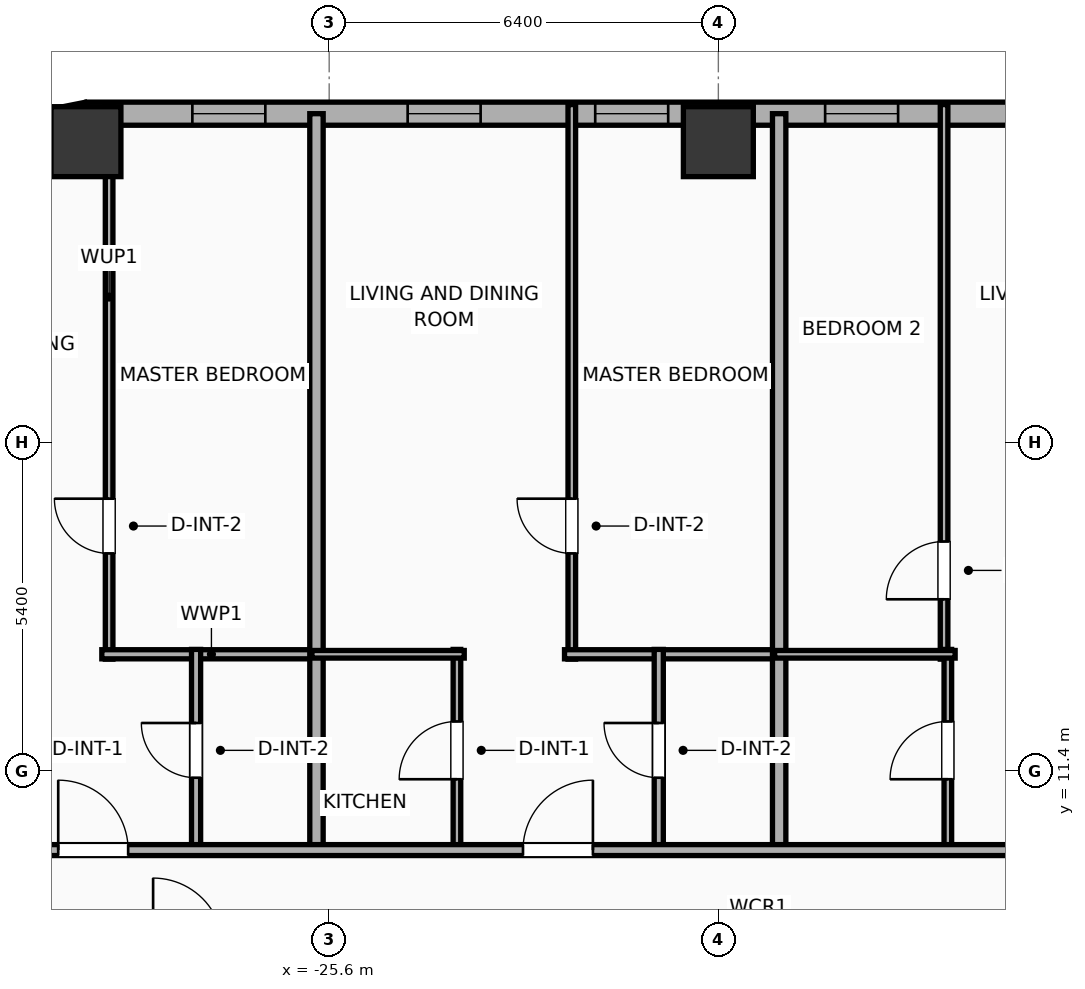
"""IFC4 building model, lengths in metres.
Left out: names, types, materials, properties, quantities, classifications, styles, units other than length and angle.
Written with IfcOpenShell. Run it as: python <this file> out.ifc"""

import sys

from ifc_helpers import new_model, si_unit, direction, frame, frame_2d, origin, origin_2d, place, context, subcontext, project, spatial, rectangle, hollow_rectangle, extrude, element, fill, save


model = new_model("IFC4")
c1 = context("Model", 3, precision=1e-05, world=origin(), true_north=direction((0.0, 1.0)))
c2 = subcontext(c1, "Body", "Model", "MODEL_VIEW")
j1 = project(units=[si_unit("LENGTHUNIT", "METRE"), si_unit("PLANEANGLEUNIT", "RADIAN")], contexts=[c1])
p1 = place(None, origin())
s1 = spatial("IfcSite", under=j1, at=p1, CompositionType="ELEMENT")
p2 = place(p1, origin())
s2 = spatial("IfcBuilding", under=s1, at=p2, CompositionType="ELEMENT")
p3 = place(p2, frame((0.0, 0.0, 41.6)))
s3 = spatial("IfcBuildingStorey", under=s2, at=p3, CompositionType="ELEMENT", Elevation=41.6)
for number, where, z_axis, x_axis in (
    (1, (-19.2, 21.75, 0.0), (0.0, 0.0, 1.0), (1.0, 0.0, 0.0)),
    (2, (-29.6, 21.75, 0.0), (0.0, 0.0, 1.0), (1.0, 0.0, 0.0)),
):
    element("IfcColumn", number, at=place(p3, frame(where, z_axis=z_axis, x_axis=x_axis)), inside=s3, PredefinedType="COLUMN", context=c2, shape_type="SweptSolid", body=[
        extrude(hollow_rectangle(XDim=1.15, YDim=1.15, WallThickness=0.04, at=origin_2d()), origin(), (0.0, 0.0, 1.0), 3.9),
    ])
p4 = place(p3, frame((-31.057, 21.917, 0.0), z_axis=(0.0, 0.0, 1.0), x_axis=(0.980786132421, 0.195086038585, 0.0)))
e3 = element("IfcWall", 3, at=p4, inside=s3, PredefinedType="ELEMENTEDWALL", context=c2, shape_type="SweptSolid", body=[
    extrude(rectangle(XDim=1.504, YDim=0.38, at=frame_2d((0.752, 0.0))), origin(), (0.0, 0.0, 1.0), 3.65),
])
p5 = place(p3, frame((-29.581, 22.21, 0.0), z_axis=(0.0, 0.0, 1.0), x_axis=(1.0, 0.0, 0.0)))
e4 = element("IfcWall", 4, at=p5, inside=s3, PredefinedType="ELEMENTEDWALL", context=c2, shape_type="SweptSolid", body=[
    extrude(rectangle(XDim=51.963, YDim=0.38, at=frame_2d((25.981, 0.0))), origin(), (0.0, 0.0, 1.0), 3.65),
])
p6 = place(p5, frame((25.631, 0.0, 0.75)))
e5 = element("IfcOpeningElement", 5, at=p6, cuts=e4, PredefinedType="OPENING", context=c2, shape_type="SweptSolid", body=[
    extrude(rectangle(XDim=2.4, YDim=2.1, at=frame_2d((1.2, 1.05))), frame((0.0, 0.2, 0.0), z_axis=(0.0, -1.0, 0.0), x_axis=(1.0, 0.0, 0.0)), (0.0, 0.0, 1.0), 0.4),
])
p7 = place(p5, frame((42.952, 0.0, 0.75)))
e6 = element("IfcOpeningElement", 6, at=p7, cuts=e4, PredefinedType="OPENING", context=c2, shape_type="SweptSolid", body=[
    extrude(rectangle(XDim=2.4, YDim=2.1, at=frame_2d((1.2, 1.05))), frame((0.0, 0.2, 0.0), z_axis=(0.0, -1.0, 0.0), x_axis=(1.0, 0.0, 0.0)), (0.0, 0.0, 1.0), 0.4),
])
p8 = place(p5, frame((1.731, 0.0, 0.75)))
e7 = element("IfcOpeningElement", 7, at=p8, cuts=e4, PredefinedType="OPENING", context=c2, shape_type="SweptSolid", body=[
    extrude(rectangle(XDim=1.2, YDim=2.05, at=frame_2d((0.6, 1.025))), frame((0.0, 0.2, 0.0), z_axis=(0.0, -1.0, 0.0), x_axis=(1.0, 0.0, 0.0)), (0.0, 0.0, 1.0), 0.4),
])
p9 = place(p5, frame((5.272, 0.0, 0.75)))
e8 = element("IfcOpeningElement", 8, at=p9, cuts=e4, PredefinedType="OPENING", context=c2, shape_type="SweptSolid", body=[
    extrude(rectangle(XDim=1.2, YDim=2.05, at=frame_2d((0.6, 1.025))), frame((0.0, 0.2, 0.0), z_axis=(0.0, -1.0, 0.0), x_axis=(1.0, 0.0, 0.0)), (0.0, 0.0, 1.0), 0.4),
])
p10 = place(p5, frame((8.356, 0.0, 0.75)))
e9 = element("IfcOpeningElement", 9, at=p10, cuts=e4, PredefinedType="OPENING", context=c2, shape_type="SweptSolid", body=[
    extrude(rectangle(XDim=1.2, YDim=2.05, at=frame_2d((0.6, 1.025))), frame((0.0, 0.2, 0.0), z_axis=(0.0, -1.0, 0.0), x_axis=(1.0, 0.0, 0.0)), (0.0, 0.0, 1.0), 0.4),
])
p11 = place(p5, frame((15.632, 0.0, 0.75)))
e10 = element("IfcOpeningElement", 10, at=p11, cuts=e4, PredefinedType="OPENING", context=c2, shape_type="SweptSolid", body=[
    extrude(rectangle(XDim=1.2, YDim=2.05, at=frame_2d((0.6, 1.025))), frame((0.0, 0.2, 0.0), z_axis=(0.0, -1.0, 0.0), x_axis=(1.0, 0.0, 0.0)), (0.0, 0.0, 1.0), 0.4),
])
p12 = place(p5, frame((12.137, 0.0, 0.75)))
e11 = element("IfcOpeningElement", 11, at=p12, cuts=e4, PredefinedType="OPENING", context=c2, shape_type="SweptSolid", body=[
    extrude(rectangle(XDim=1.2, YDim=2.05, at=frame_2d((0.6, 1.025))), frame((0.0, 0.2, 0.0), z_axis=(0.0, -1.0, 0.0), x_axis=(1.0, 0.0, 0.0)), (0.0, 0.0, 1.0), 0.4),
])
p13 = place(p5, frame((18.756, 0.0, 0.75)))
e12 = element("IfcOpeningElement", 12, at=p13, cuts=e4, PredefinedType="OPENING", context=c2, shape_type="SweptSolid", body=[
    extrude(rectangle(XDim=1.2, YDim=2.05, at=frame_2d((0.6, 1.025))), frame((0.0, 0.2, 0.0), z_axis=(0.0, -1.0, 0.0), x_axis=(1.0, 0.0, 0.0)), (0.0, 0.0, 1.0), 0.4),
])
p14 = place(p5, frame((22.907, 0.0, 0.75)))
e13 = element("IfcOpeningElement", 13, at=p14, cuts=e4, PredefinedType="OPENING", context=c2, shape_type="SweptSolid", body=[
    extrude(rectangle(XDim=1.2, YDim=2.05, at=frame_2d((0.6, 1.025))), frame((0.0, 0.2, 0.0), z_axis=(0.0, -1.0, 0.0), x_axis=(1.0, 0.0, 0.0)), (0.0, 0.0, 1.0), 0.4),
])
p15 = place(p5, frame((36.381, 0.0, 0.75)))
e14 = element("IfcOpeningElement", 14, at=p15, cuts=e4, PredefinedType="OPENING", context=c2, shape_type="SweptSolid", body=[
    extrude(rectangle(XDim=1.2, YDim=2.05, at=frame_2d((0.6, 1.025))), frame((0.0, 0.2, 0.0), z_axis=(0.0, -1.0, 0.0), x_axis=(1.0, 0.0, 0.0)), (0.0, 0.0, 1.0), 0.4),
])
p16 = place(p5, frame((32.886, 0.0, 0.75)))
e15 = element("IfcOpeningElement", 15, at=p16, cuts=e4, PredefinedType="OPENING", context=c2, shape_type="SweptSolid", body=[
    extrude(rectangle(XDim=1.2, YDim=2.05, at=frame_2d((0.6, 1.025))), frame((0.0, 0.2, 0.0), z_axis=(0.0, -1.0, 0.0), x_axis=(1.0, 0.0, 0.0)), (0.0, 0.0, 1.0), 0.4),
])
p17 = place(p5, frame((39.556, 0.0, 0.75)))
e16 = element("IfcOpeningElement", 16, at=p17, cuts=e4, PredefinedType="OPENING", context=c2, shape_type="SweptSolid", body=[
    extrude(rectangle(XDim=1.2, YDim=2.05, at=frame_2d((0.6, 1.025))), frame((0.0, 0.2, 0.0), z_axis=(0.0, -1.0, 0.0), x_axis=(1.0, 0.0, 0.0)), (0.0, 0.0, 1.0), 0.4),
])
p18 = place(p5, frame((46.885, 0.0, 0.75)))
e17 = element("IfcOpeningElement", 17, at=p18, cuts=e4, PredefinedType="OPENING", context=c2, shape_type="SweptSolid", body=[
    extrude(rectangle(XDim=1.2, YDim=2.05, at=frame_2d((0.6, 1.025))), frame((0.0, 0.2, 0.0), z_axis=(0.0, -1.0, 0.0), x_axis=(1.0, 0.0, 0.0)), (0.0, 0.0, 1.0), 0.4),
])
p19 = place(p5, frame((49.531, 0.0, 0.75)))
e18 = element("IfcOpeningElement", 18, at=p19, cuts=e4, PredefinedType="OPENING", context=c2, shape_type="SweptSolid", body=[
    extrude(rectangle(XDim=1.2, YDim=2.05, at=frame_2d((0.6, 1.025))), frame((0.0, 0.2, 0.0), z_axis=(0.0, -1.0, 0.0), x_axis=(1.0, 0.0, 0.0)), (0.0, 0.0, 1.0), 0.4),
])
p20 = place(p3, frame((-29.219, 13.24, 0.0), z_axis=(0.0, 0.0, 1.0), x_axis=(0.0, 1.0, 0.0)))
e19 = element("IfcWall", 19, at=p20, inside=s3, PredefinedType="PARTITIONING", context=c2, shape_type="SweptSolid", body=[
    extrude(rectangle(XDim=9.12, YDim=0.125, at=frame_2d((4.56, 0.0))), origin(), (0.0, 0.0, 1.0), 3.65),
])
p21 = place(p20, frame((1.739, 0.0, 0.0)))
e20 = element("IfcOpeningElement", 20, at=p21, cuts=e19, PredefinedType="OPENING", context=c2, shape_type="SweptSolid", body=[
    extrude(rectangle(XDim=0.9, YDim=2.05, at=frame_2d((0.45, 1.025))), frame((0.0, 0.073, 0.0), z_axis=(0.0, -1.0, 0.0), x_axis=(1.0, 0.0, 0.0)), (0.0, 0.0, 1.0), 0.145),
])
p22 = place(p3, frame((-29.339, 13.32, 0.0), z_axis=(0.0, 0.0, 1.0), x_axis=(1.0, 0.0, 0.0)))
e21 = element("IfcWall", 21, at=p22, inside=s3, PredefinedType="PLUMBINGWALL", context=c2, shape_type="SweptSolid", body=[
    extrude(rectangle(XDim=3.605, YDim=0.15, at=frame_2d((1.803, 0.0))), origin(), (0.0, 0.0, 1.0), 3.65),
])
p23 = place(p3, frame((-27.789, 10.08, 0.0), z_axis=(0.0, 0.0, 1.0), x_axis=(0.0, 1.0, 0.0)))
e22 = element("IfcWall", 22, at=p23, inside=s3, PredefinedType="PLUMBINGWALL", context=c2, shape_type="SweptSolid", body=[
    extrude(rectangle(XDim=3.32, YDim=0.15, at=frame_2d((1.66, 0.0))), origin(), (0.0, 0.0, 1.0), 3.65),
])
p24 = place(p23, frame((1.21, 0.0, 0.0)))
e23 = element("IfcOpeningElement", 23, at=p24, cuts=e22, PredefinedType="OPENING", context=c2, shape_type="SweptSolid", body=[
    extrude(rectangle(XDim=0.9, YDim=2.05, at=frame_2d((0.45, 1.025))), frame((0.0, 0.085, 0.0), z_axis=(0.0, -1.0, 0.0), x_axis=(1.0, 0.0, 0.0)), (0.0, 0.0, 1.0), 0.17),
])
p25 = place(p3, frame((-25.809, 10.02, 0.0), z_axis=(0.0, 0.0, 1.0), x_axis=(0.0, 1.0, 0.0)))
e24 = element("IfcWall", 24, at=p25, inside=s3, PredefinedType="PARTITIONING", context=c2, shape_type="SweptSolid", body=[
    extrude(rectangle(XDim=12.19, YDim=0.22, at=frame_2d((6.095, 0.0))), origin(), (0.0, 0.0, 1.0), 3.65),
])
p26 = place(p3, frame((-21.61, 13.24, 0.0), z_axis=(0.0, 0.0, 1.0), x_axis=(0.0, 1.0, 0.0)))
e25 = element("IfcWall", 25, at=p26, inside=s3, PredefinedType="PARTITIONING", context=c2, shape_type="SweptSolid", body=[
    extrude(rectangle(XDim=9.12, YDim=0.125, at=frame_2d((4.56, 0.0))), origin(), (0.0, 0.0, 1.0), 3.65),
])
p27 = place(p26, frame((1.739, 0.0, 0.0)))
e26 = element("IfcOpeningElement", 26, at=p27, cuts=e25, PredefinedType="OPENING", context=c2, shape_type="SweptSolid", body=[
    extrude(rectangle(XDim=0.9, YDim=2.05, at=frame_2d((0.45, 1.025))), frame((0.0, 0.073, 0.0), z_axis=(0.0, -1.0, 0.0), x_axis=(1.0, 0.0, 0.0)), (0.0, 0.0, 1.0), 0.145),
])
p28 = place(p3, frame((-21.73, 13.32, 0.0), z_axis=(0.0, 0.0, 1.0), x_axis=(1.0, 0.0, 0.0)))
e27 = element("IfcWall", 27, at=p28, inside=s3, PredefinedType="PLUMBINGWALL", context=c2, shape_type="SweptSolid", body=[
    extrude(rectangle(XDim=3.605, YDim=0.15, at=frame_2d((1.802, 0.0))), origin(), (0.0, 0.0, 1.0), 3.65),
])
p29 = place(p3, frame((-23.499, 10.08, 0.0), z_axis=(0.0, 0.0, 1.0), x_axis=(0.0, 1.0, 0.0)))
e28 = element("IfcWall", 28, at=p29, inside=s3, PredefinedType="PARTITIONING", context=c2, shape_type="SweptSolid", body=[
    extrude(rectangle(XDim=3.32, YDim=0.125, at=frame_2d((1.66, 0.0))), origin(), (0.0, 0.0, 1.0), 3.65),
])
p30 = place(p29, frame((1.185, 0.0, 0.0)))
e29 = element("IfcOpeningElement", 29, at=p30, cuts=e28, PredefinedType="OPENING", context=c2, shape_type="SweptSolid", body=[
    extrude(rectangle(XDim=0.95, YDim=2.05, at=frame_2d((0.475, 1.025))), frame((0.0, 0.073, 0.0), z_axis=(0.0, -1.0, 0.0), x_axis=(1.0, 0.0, 0.0)), (0.0, 0.0, 1.0), 0.145),
])
p31 = place(p3, frame((-25.884, 13.32, 0.0), z_axis=(0.0, 0.0, 1.0), x_axis=(1.0, 0.0, 0.0)))
e30 = element("IfcWall", 30, at=p31, inside=s3, PredefinedType="PARTITIONING", context=c2, shape_type="SweptSolid", body=[
    extrude(rectangle(XDim=2.505, YDim=0.125, at=frame_2d((1.252, 0.0))), origin(), (0.0, 0.0, 1.0), 3.65),
])
p32 = place(p3, frame((-20.18, 10.08, 0.0), z_axis=(0.0, 0.0, 1.0), x_axis=(0.0, 1.0, 0.0)))
e31 = element("IfcWall", 31, at=p32, inside=s3, PredefinedType="PLUMBINGWALL", context=c2, shape_type="SweptSolid", body=[
    extrude(rectangle(XDim=3.32, YDim=0.15, at=frame_2d((1.66, 0.0))), origin(), (0.0, 0.0, 1.0), 3.65),
])
p33 = place(p32, frame((1.21, 0.0, 0.0)))
e32 = element("IfcOpeningElement", 32, at=p33, cuts=e31, PredefinedType="OPENING", context=c2, shape_type="SweptSolid", body=[
    extrude(rectangle(XDim=0.9, YDim=2.05, at=frame_2d((0.45, 1.025))), frame((0.0, 0.085, 0.0), z_axis=(0.0, -1.0, 0.0), x_axis=(1.0, 0.0, 0.0)), (0.0, 0.0, 1.0), 0.17),
])
p34 = place(p3, frame((-18.2, 10.02, 0.0), z_axis=(0.0, 0.0, 1.0), x_axis=(0.0, 1.0, 0.0)))
e33 = element("IfcWall", 33, at=p34, inside=s3, PredefinedType="PARTITIONING", context=c2, shape_type="SweptSolid", body=[
    extrude(rectangle(XDim=12.19, YDim=0.22, at=frame_2d((6.095, 0.0))), origin(), (0.0, 0.0, 1.0), 3.65),
])
p35 = place(p3, frame((-15.488, 13.24, 0.0), z_axis=(0.0, 0.0, 1.0), x_axis=(0.0, 1.0, 0.0)))
e34 = element("IfcWall", 34, at=p35, inside=s3, PredefinedType="PARTITIONING", context=c2, shape_type="SweptSolid", body=[
    extrude(rectangle(XDim=9.12, YDim=0.125, at=frame_2d((4.56, 0.0))), origin(), (0.0, 0.0, 1.0), 3.65),
])
p36 = place(p35, frame((0.984, 0.0, 0.0)))
e35 = element("IfcOpeningElement", 35, at=p36, cuts=e34, PredefinedType="OPENING", context=c2, shape_type="SweptSolid", body=[
    extrude(rectangle(XDim=0.95, YDim=2.05, at=frame_2d((0.475, 1.025))), frame((0.0, 0.073, 0.0), z_axis=(0.0, -1.0, 0.0), x_axis=(1.0, 0.0, 0.0)), (0.0, 0.0, 1.0), 0.145),
])
p37 = place(p3, frame((-15.426, 10.08, 0.0), z_axis=(0.0, 0.0, 1.0), x_axis=(0.0, 1.0, 0.0)))
e36 = element("IfcWall", 36, at=p37, inside=s3, PredefinedType="PARTITIONING", context=c2, shape_type="SweptSolid", body=[
    extrude(rectangle(XDim=3.32, YDim=0.125, at=frame_2d((1.66, 0.0))), origin(), (0.0, 0.0, 1.0), 3.65),
])
p38 = place(p37, frame((1.185, 0.0, 0.0)))
e37 = element("IfcOpeningElement", 37, at=p38, cuts=e36, PredefinedType="OPENING", context=c2, shape_type="SweptSolid", body=[
    extrude(rectangle(XDim=0.95, YDim=2.05, at=frame_2d((0.475, 1.025))), frame((0.0, 0.073, 0.0), z_axis=(0.0, -1.0, 0.0), x_axis=(1.0, 0.0, 0.0)), (0.0, 0.0, 1.0), 0.145),
])
p39 = place(p3, frame((-18.275, 13.32, 0.0), z_axis=(0.0, 0.0, 1.0), x_axis=(1.0, 0.0, 0.0)))
e38 = element("IfcWall", 38, at=p39, inside=s3, PredefinedType="PARTITIONING", context=c2, shape_type="SweptSolid", body=[
    extrude(rectangle(XDim=2.969, YDim=0.125, at=frame_2d((1.484, 0.0))), origin(), (0.0, 0.0, 1.0), 3.65),
])
p40 = place(p3, frame((-33.41, 10.1, 0.0), z_axis=(0.0, 0.0, 1.0), x_axis=(1.0, 0.0, 0.0)))
e39 = element("IfcWall", 39, at=p40, inside=s3, PredefinedType="PARTITIONING", context=c2, shape_type="SweptSolid", body=[
    extrude(rectangle(XDim=59.62, YDim=0.18, at=frame_2d((29.81, 0.0))), origin(), (0.0, 0.0, 1.0), 3.65),
])
p41 = place(p40, frame((3.354, 0.0, 0.0)))
e40 = element("IfcOpeningElement", 40, at=p41, cuts=e39, PredefinedType="OPENING", context=c2, shape_type="SweptSolid", body=[
    extrude(rectangle(XDim=1.15, YDim=2.05, at=frame_2d((0.575, 1.025))), frame((0.0, 0.1, 0.0), z_axis=(0.0, -1.0, 0.0), x_axis=(1.0, 0.0, 0.0)), (0.0, 0.0, 1.0), 0.2),
])
p42 = place(p40, frame((10.997, 0.0, 0.0)))
e41 = element("IfcOpeningElement", 41, at=p42, cuts=e39, PredefinedType="OPENING", context=c2, shape_type="SweptSolid", body=[
    extrude(rectangle(XDim=1.15, YDim=2.05, at=frame_2d((0.575, 1.025))), frame((0.0, 0.1, 0.0), z_axis=(0.0, -1.0, 0.0), x_axis=(1.0, 0.0, 0.0)), (0.0, 0.0, 1.0), 0.2),
])
p43 = place(p40, frame((20.232, 0.0, 0.0)))
e42 = element("IfcOpeningElement", 42, at=p43, cuts=e39, PredefinedType="OPENING", context=c2, shape_type="SweptSolid", body=[
    extrude(rectangle(XDim=1.15, YDim=2.05, at=frame_2d((0.575, 1.025))), frame((0.0, 0.1, 0.0), z_axis=(0.0, -1.0, 0.0), x_axis=(1.0, 0.0, 0.0)), (0.0, 0.0, 1.0), 0.2),
])
p44 = place(p40, frame((30.38, 0.0, 0.0)))
e43 = element("IfcOpeningElement", 43, at=p44, cuts=e39, PredefinedType="OPENING", context=c2, shape_type="SweptSolid", body=[
    extrude(rectangle(XDim=1.15, YDim=2.05, at=frame_2d((0.575, 1.025))), frame((0.0, 0.1, 0.0), z_axis=(0.0, -1.0, 0.0), x_axis=(1.0, 0.0, 0.0)), (0.0, 0.0, 1.0), 0.2),
])
p45 = place(p40, frame((40.998, 0.0, 0.0)))
e44 = element("IfcOpeningElement", 44, at=p45, cuts=e39, PredefinedType="OPENING", context=c2, shape_type="SweptSolid", body=[
    extrude(rectangle(XDim=1.15, YDim=2.05, at=frame_2d((0.575, 1.025))), frame((0.0, 0.1, 0.0), z_axis=(0.0, -1.0, 0.0), x_axis=(1.0, 0.0, 0.0)), (0.0, 0.0, 1.0), 0.2),
])
p46 = place(p40, frame((49.428, 0.0, 0.0)))
e45 = element("IfcOpeningElement", 45, at=p46, cuts=e39, PredefinedType="OPENING", context=c2, shape_type="SweptSolid", body=[
    extrude(rectangle(XDim=0.9, YDim=2.05, at=frame_2d((0.45, 1.025))), frame((0.0, 0.1, 0.0), z_axis=(0.0, -1.0, 0.0), x_axis=(1.0, 0.0, 0.0)), (0.0, 0.0, 1.0), 0.2),
])
p47 = place(p40, frame((56.07, 0.0, 0.0)))
e46 = element("IfcOpeningElement", 46, at=p47, cuts=e39, PredefinedType="OPENING", context=c2, shape_type="SweptSolid", body=[
    extrude(rectangle(XDim=0.9, YDim=2.05, at=frame_2d((0.45, 1.025))), frame((0.0, 0.1, 0.0), z_axis=(0.0, -1.0, 0.0), x_axis=(1.0, 0.0, 0.0)), (0.0, 0.0, 1.0), 0.2),
])
p48 = place(p8, origin())
e47 = element("IfcWindow", 47, at=p48, inside=s3, PartitioningType="SINGLE_PANEL", PredefinedType="WINDOW", context=c2, shape_type="SweptSolid", body=[
    extrude(rectangle(XDim=1.2, YDim=2.05, at=frame_2d((0.6, 1.025))), frame((0.0, 0.03, 0.0), z_axis=(0.0, -1.0, 0.0), x_axis=(1.0, 0.0, 0.0)), (0.0, 0.0, 1.0), 0.06),
])
fill(e7, e47)
p49 = place(p9, origin())
e48 = element("IfcWindow", 48, at=p49, inside=s3, PartitioningType="SINGLE_PANEL", PredefinedType="WINDOW", context=c2, shape_type="SweptSolid", body=[
    extrude(rectangle(XDim=1.2, YDim=2.05, at=frame_2d((0.6, 1.025))), frame((0.0, 0.03, 0.0), z_axis=(0.0, -1.0, 0.0), x_axis=(1.0, 0.0, 0.0)), (0.0, 0.0, 1.0), 0.06),
])
fill(e8, e48)
p50 = place(p10, origin())
e49 = element("IfcWindow", 49, at=p50, inside=s3, PartitioningType="SINGLE_PANEL", PredefinedType="WINDOW", context=c2, shape_type="SweptSolid", body=[
    extrude(rectangle(XDim=1.2, YDim=2.05, at=frame_2d((0.6, 1.025))), frame((0.0, 0.03, 0.0), z_axis=(0.0, -1.0, 0.0), x_axis=(1.0, 0.0, 0.0)), (0.0, 0.0, 1.0), 0.06),
])
fill(e9, e49)
p51 = place(p12, origin())
e50 = element("IfcWindow", 50, at=p51, inside=s3, PartitioningType="SINGLE_PANEL", PredefinedType="WINDOW", context=c2, shape_type="SweptSolid", body=[
    extrude(rectangle(XDim=1.2, YDim=2.05, at=frame_2d((0.6, 1.025))), frame((0.0, 0.03, 0.0), z_axis=(0.0, -1.0, 0.0), x_axis=(1.0, 0.0, 0.0)), (0.0, 0.0, 1.0), 0.06),
])
fill(e11, e50)
p52 = place(p21, origin())
e51 = element("IfcDoor", 51, at=p52, inside=s3, OperationType="SINGLE_SWING_RIGHT", PredefinedType="DOOR", context=c2, shape_type="SweptSolid", body=[
    extrude(rectangle(XDim=0.9, YDim=2.05, at=frame_2d((0.45, 1.025))), frame((0.0, 0.025, 0.0), z_axis=(0.0, -1.0, 0.0), x_axis=(1.0, 0.0, 0.0)), (0.0, 0.0, 1.0), 0.05),
])
fill(e20, e51)
p53 = place(p24, origin())
e52 = element("IfcDoor", 52, at=p53, inside=s3, OperationType="SINGLE_SWING_RIGHT", PredefinedType="DOOR", context=c2, shape_type="SweptSolid", body=[
    extrude(rectangle(XDim=0.9, YDim=2.05, at=frame_2d((0.45, 1.025))), frame((0.0, 0.025, 0.0), z_axis=(0.0, -1.0, 0.0), x_axis=(1.0, 0.0, 0.0)), (0.0, 0.0, 1.0), 0.05),
])
fill(e23, e52)
p54 = place(p27, origin())
e53 = element("IfcDoor", 53, at=p54, inside=s3, OperationType="SINGLE_SWING_RIGHT", PredefinedType="DOOR", context=c2, shape_type="SweptSolid", body=[
    extrude(rectangle(XDim=0.9, YDim=2.05, at=frame_2d((0.45, 1.025))), frame((0.0, 0.025, 0.0), z_axis=(0.0, -1.0, 0.0), x_axis=(1.0, 0.0, 0.0)), (0.0, 0.0, 1.0), 0.05),
])
fill(e26, e53)
p55 = place(p30, origin())
e54 = element("IfcDoor", 54, at=p55, inside=s3, OperationType="SINGLE_SWING_LEFT", PredefinedType="DOOR", context=c2, shape_type="SweptSolid", body=[
    extrude(rectangle(XDim=0.95, YDim=2.05, at=frame_2d((0.475, 1.025))), frame((0.0, 0.025, 0.0), z_axis=(0.0, -1.0, 0.0), x_axis=(1.0, 0.0, 0.0)), (0.0, 0.0, 1.0), 0.05),
])
fill(e29, e54)
p56 = place(p33, origin())
e55 = element("IfcDoor", 55, at=p56, inside=s3, OperationType="SINGLE_SWING_RIGHT", PredefinedType="DOOR", context=c2, shape_type="SweptSolid", body=[
    extrude(rectangle(XDim=0.9, YDim=2.05, at=frame_2d((0.45, 1.025))), frame((0.0, 0.025, 0.0), z_axis=(0.0, -1.0, 0.0), x_axis=(1.0, 0.0, 0.0)), (0.0, 0.0, 1.0), 0.05),
])
fill(e32, e55)
p57 = place(p36, origin())
e56 = element("IfcDoor", 56, at=p57, inside=s3, OperationType="SINGLE_SWING_LEFT", PredefinedType="DOOR", context=c2, shape_type="SweptSolid", body=[
    extrude(rectangle(XDim=0.95, YDim=2.05, at=frame_2d((0.475, 1.025))), frame((0.0, 0.025, 0.0), z_axis=(0.0, -1.0, 0.0), x_axis=(1.0, 0.0, 0.0)), (0.0, 0.0, 1.0), 0.05),
])
fill(e35, e56)
p58 = place(p38, origin())
e57 = element("IfcDoor", 57, at=p58, inside=s3, OperationType="SINGLE_SWING_LEFT", PredefinedType="DOOR", context=c2, shape_type="SweptSolid", body=[
    extrude(rectangle(XDim=0.95, YDim=2.05, at=frame_2d((0.475, 1.025))), frame((0.0, 0.025, 0.0), z_axis=(0.0, -1.0, 0.0), x_axis=(1.0, 0.0, 0.0)), (0.0, 0.0, 1.0), 0.05),
])
fill(e37, e57)
p59 = place(p41, origin())
e58 = element("IfcDoor", 58, at=p59, inside=s3, OperationType="SINGLE_SWING_LEFT", PredefinedType="DOOR", context=c2, shape_type="SweptSolid", body=[
    extrude(rectangle(XDim=1.15, YDim=2.05, at=frame_2d((0.575, 1.025))), frame((0.0, 0.025, 0.0), z_axis=(0.0, -1.0, 0.0), x_axis=(1.0, 0.0, 0.0)), (0.0, 0.0, 1.0), 0.05),
])
fill(e40, e58)
p60 = place(p42, origin())
e59 = element("IfcDoor", 59, at=p60, inside=s3, OperationType="SINGLE_SWING_RIGHT", PredefinedType="DOOR", context=c2, shape_type="SweptSolid", body=[
    extrude(rectangle(XDim=1.15, YDim=2.05, at=frame_2d((0.575, 1.025))), frame((0.0, 0.025, 0.0), z_axis=(0.0, -1.0, 0.0), x_axis=(1.0, 0.0, 0.0)), (0.0, 0.0, 1.0), 0.05),
])
fill(e41, e59)
save(model, sys.argv[1])
